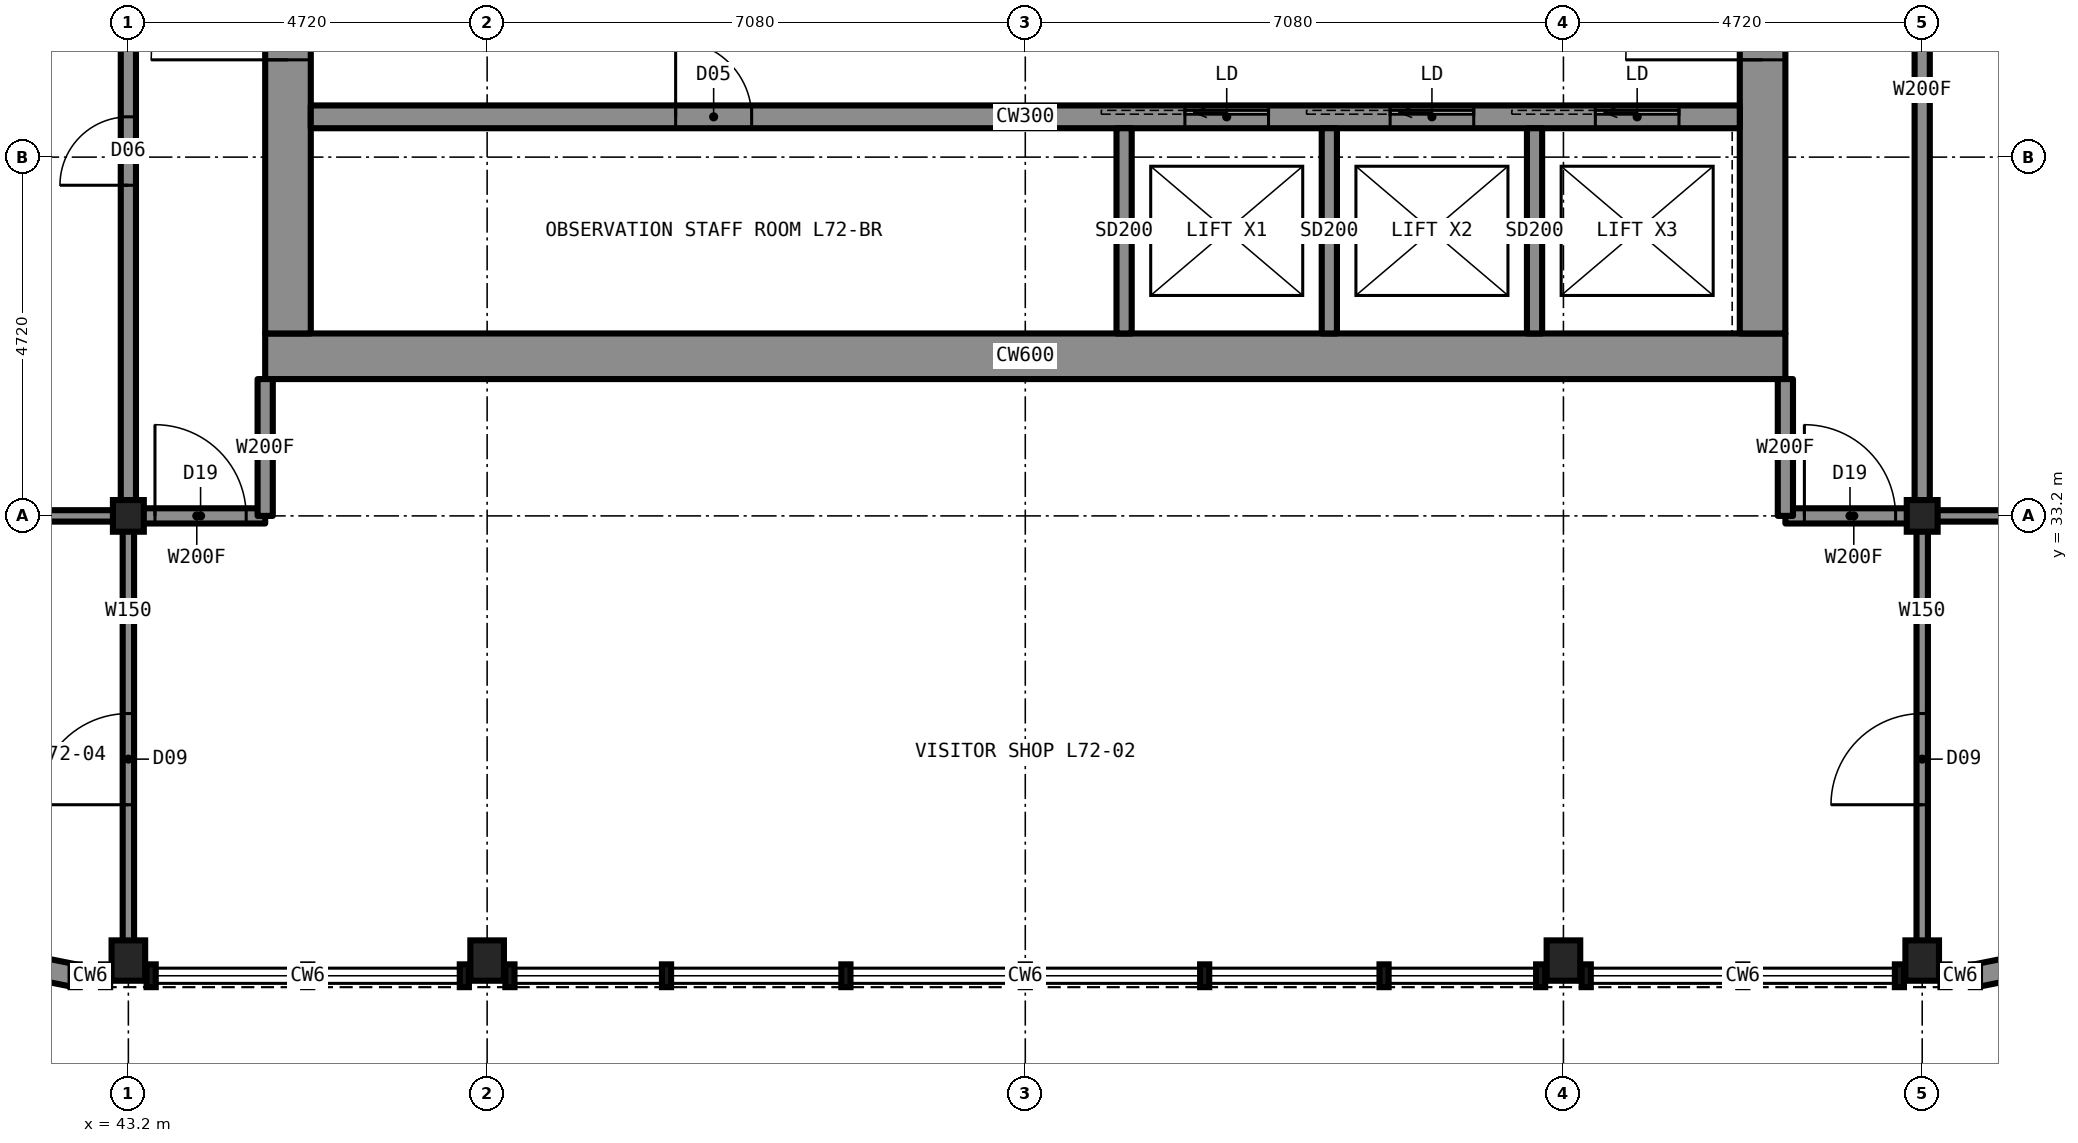
"""IFC4 building model, lengths in metres.
Left out: names, types, materials, properties, quantities, classifications, styles, units other than length and angle.
Written with IfcOpenShell. Run it as: python <this file> out.ifc"""

import sys

from ifc_helpers import new_model, si_unit, direction, frame, frame_2d, origin, origin_2d, place, context, subcontext, project, spatial, rectangle, i_section, extrude, element, fill, save


model = new_model("IFC4")
c1 = context("Model", 3, precision=1e-05, world=origin(), true_north=direction((0.0, 1.0)))
c2 = subcontext(c1, "Body", "Model", "MODEL_VIEW")
j1 = project(units=[si_unit("LENGTHUNIT", "METRE"), si_unit("PLANEANGLEUNIT", "RADIAN")], contexts=[c1])
p1 = place(None, origin())
s1 = spatial("IfcSite", under=j1, at=p1, CompositionType="ELEMENT")
p2 = place(p1, origin())
s2 = spatial("IfcBuilding", under=s1, at=p2, CompositionType="ELEMENT")
p3 = place(p2, frame((0.0, 0.0, 266.7)))
s3 = spatial("IfcBuildingStorey", under=s2, at=p3, CompositionType="ELEMENT", Elevation=266.7)
for number, where, z_axis, x_axis in (
    (1, (43.2, 27.35, 0.0), (0.0, 0.0, 1.0), (1.0, 0.0, 0.0)),
    (2, (47.92, 27.35, 0.0), (0.0, 0.0, 1.0), (1.0, 0.0, 0.0)),
    (3, (62.08, 27.35, 0.0), (0.0, 0.0, 1.0), (1.0, 0.0, 0.0)),
    (4, (66.8, 27.35, 0.0), (0.0, 0.0, 1.0), (1.0, 0.0, 0.0)),
):
    element("IfcColumn", number, at=place(p3, frame(where, z_axis=z_axis, x_axis=x_axis)), inside=s3, PredefinedType="COLUMN", context=c2, shape_type="SweptSolid", body=[
        extrude(i_section(OverallWidth=0.442, OverallDepth=0.531, WebThickness=0.066, FlangeThickness=0.106, at=origin_2d()), origin(), (0.0, 0.0, 1.0), 5.5),
    ])
for number, where, z_axis, x_axis in (
    (5, (43.2, 33.2, 0.0), (0.0, 0.0, 1.0), (1.0, 0.0, 0.0)),
    (6, (66.8, 33.2, 0.0), (0.0, 0.0, 1.0), (1.0, 0.0, 0.0)),
):
    element("IfcColumn", number, at=place(p3, frame(where, z_axis=z_axis, x_axis=x_axis)), inside=s3, PredefinedType="COLUMN", context=c2, shape_type="SweptSolid", body=[
        extrude(i_section(OverallWidth=0.406, OverallDepth=0.417, WebThickness=0.03, FlangeThickness=0.048, at=origin_2d()), origin(), (0.0, 0.0, 1.0), 5.5),
    ])
p4 = place(p3, frame((45.0, 35.3, 0.0), z_axis=(0.0, 0.0, 1.0), x_axis=(1.0, 0.0, 0.0)))
e7 = element("IfcWall", 7, at=p4, inside=s3, PredefinedType="SHEAR", context=c2, shape_type="SweptSolid", body=[
    extrude(rectangle(XDim=20.0, YDim=0.6, at=frame_2d((10.0, 0.0))), origin(), (0.0, 0.0, 1.0), 5.5),
])
p5 = place(p3, frame((64.7, 35.6, 0.0), z_axis=(0.0, 0.0, 1.0), x_axis=(0.0, 1.0, 0.0)))
e8 = element("IfcWall", 8, at=p5, inside=s3, PredefinedType="SHEAR", context=c2, shape_type="SweptSolid", body=[
    extrude(rectangle(XDim=18.8, YDim=0.6, at=frame_2d((9.4, 0.0))), origin(), (0.0, 0.0, 1.0), 5.5),
])
p6 = place(p5, frame((13.4, 0.0, 0.0)))
e9 = element("IfcOpeningElement", 9, at=p6, cuts=e8, PredefinedType="OPENING", context=c2, shape_type="SweptSolid", body=[
    extrude(rectangle(XDim=1.8, YDim=2.2, at=frame_2d((0.9, 1.1))), frame((0.0, 0.31, 0.0), z_axis=(0.0, -1.0, 0.0), x_axis=(1.0, 0.0, 0.0)), (0.0, 0.0, 1.0), 0.62),
])
p7 = place(p5, frame((3.6, 0.0, 0.0)))
e10 = element("IfcOpeningElement", 10, at=p7, cuts=e8, PredefinedType="OPENING", context=c2, shape_type="SweptSolid", body=[
    extrude(rectangle(XDim=1.8, YDim=2.2, at=frame_2d((0.9, 1.1))), frame((0.0, 0.31, 0.0), z_axis=(0.0, -1.0, 0.0), x_axis=(1.0, 0.0, 0.0)), (0.0, 0.0, 1.0), 0.62),
])
p8 = place(p3, frame((45.3, 35.6, 0.0), z_axis=(0.0, 0.0, 1.0), x_axis=(0.0, 1.0, 0.0)))
e11 = element("IfcWall", 11, at=p8, inside=s3, PredefinedType="SHEAR", context=c2, shape_type="SweptSolid", body=[
    extrude(rectangle(XDim=18.8, YDim=0.6, at=frame_2d((9.4, 0.0))), origin(), (0.0, 0.0, 1.0), 5.5),
])
p9 = place(p8, frame((13.4, 0.0, 0.0)))
e12 = element("IfcOpeningElement", 12, at=p9, cuts=e11, PredefinedType="OPENING", context=c2, shape_type="SweptSolid", body=[
    extrude(rectangle(XDim=1.8, YDim=2.2, at=frame_2d((0.9, 1.1))), frame((0.0, 0.31, 0.0), z_axis=(0.0, -1.0, 0.0), x_axis=(1.0, 0.0, 0.0)), (0.0, 0.0, 1.0), 0.62),
])
p10 = place(p8, frame((3.6, 0.0, 0.0)))
e13 = element("IfcOpeningElement", 13, at=p10, cuts=e11, PredefinedType="OPENING", context=c2, shape_type="SweptSolid", body=[
    extrude(rectangle(XDim=1.8, YDim=2.2, at=frame_2d((0.9, 1.1))), frame((0.0, 0.31, 0.0), z_axis=(0.0, -1.0, 0.0), x_axis=(1.0, 0.0, 0.0)), (0.0, 0.0, 1.0), 0.62),
])
p11 = place(p8, frame((6.4, 0.0, 0.0)))
e14 = element("IfcOpeningElement", 14, at=p11, cuts=e11, PredefinedType="OPENING", context=c2, shape_type="SweptSolid", body=[
    extrude(rectangle(XDim=1.2, YDim=2.2, at=frame_2d((0.6, 1.1))), frame((0.0, 0.31, 0.0), z_axis=(0.0, -1.0, 0.0), x_axis=(1.0, 0.0, 0.0)), (0.0, 0.0, 1.0), 0.62),
])
p12 = place(p3, frame((45.6, 38.45, 0.0), z_axis=(0.0, 0.0, 1.0), x_axis=(1.0, 0.0, 0.0)))
e15 = element("IfcWall", 15, at=p12, inside=s3, PredefinedType="SHEAR", context=c2, shape_type="SweptSolid", body=[
    extrude(rectangle(XDim=18.8, YDim=0.3, at=frame_2d((9.4, 0.0))), origin(), (0.0, 0.0, 1.0), 5.5),
])
p13 = place(p12, frame((4.8, 0.0, 0.0)))
e16 = element("IfcOpeningElement", 16, at=p13, cuts=e15, PredefinedType="OPENING", context=c2, shape_type="SweptSolid", body=[
    extrude(rectangle(XDim=1.0, YDim=2.1, at=frame_2d((0.5, 1.05))), frame((0.0, 0.16, 0.0), z_axis=(0.0, -1.0, 0.0), x_axis=(1.0, 0.0, 0.0)), (0.0, 0.0, 1.0), 0.32),
])
p14 = place(p12, frame((11.5, 0.0, 0.0)))
e17 = element("IfcOpeningElement", 17, at=p14, cuts=e15, PredefinedType="OPENING", context=c2, shape_type="SweptSolid", body=[
    extrude(rectangle(XDim=1.1, YDim=2.2, at=frame_2d((0.55, 1.1))), frame((0.0, 0.16, 0.0), z_axis=(0.0, -1.0, 0.0), x_axis=(1.0, 0.0, 0.0)), (0.0, 0.0, 1.0), 0.32),
])
p15 = place(p12, frame((14.2, 0.0, 0.0)))
e18 = element("IfcOpeningElement", 18, at=p15, cuts=e15, PredefinedType="OPENING", context=c2, shape_type="SweptSolid", body=[
    extrude(rectangle(XDim=1.1, YDim=2.2, at=frame_2d((0.55, 1.1))), frame((0.0, 0.16, 0.0), z_axis=(0.0, -1.0, 0.0), x_axis=(1.0, 0.0, 0.0)), (0.0, 0.0, 1.0), 0.32),
])
p16 = place(p12, frame((16.9, 0.0, 0.0)))
e19 = element("IfcOpeningElement", 19, at=p16, cuts=e15, PredefinedType="OPENING", context=c2, shape_type="SweptSolid", body=[
    extrude(rectangle(XDim=1.1, YDim=2.2, at=frame_2d((0.55, 1.1))), frame((0.0, 0.16, 0.0), z_axis=(0.0, -1.0, 0.0), x_axis=(1.0, 0.0, 0.0)), (0.0, 0.0, 1.0), 0.32),
])
p17 = place(p3, frame((43.2, 33.2, 0.0), z_axis=(0.0, 0.0, 1.0), x_axis=(1.0, 0.0, 0.0)))
e20 = element("IfcWall", 20, at=p17, inside=s3, PredefinedType="PARTITIONING", context=c2, shape_type="SweptSolid", body=[
    extrude(rectangle(XDim=1.8, YDim=0.2, at=frame_2d((0.9, 0.0))), origin(), (0.0, 0.0, 1.0), 5.28),
])
p18 = place(p17, frame((0.35, 0.0, 0.0)))
e21 = element("IfcOpeningElement", 21, at=p18, cuts=e20, PredefinedType="OPENING", context=c2, shape_type="SweptSolid", body=[
    extrude(rectangle(XDim=1.2, YDim=2.2, at=frame_2d((0.6, 1.1))), frame((0.0, 0.11, 0.0), z_axis=(0.0, -1.0, 0.0), x_axis=(1.0, 0.0, 0.0)), (0.0, 0.0, 1.0), 0.22),
])
p19 = place(p3, frame((65.0, 33.2, 0.0), z_axis=(0.0, 0.0, 1.0), x_axis=(1.0, 0.0, 0.0)))
e22 = element("IfcWall", 22, at=p19, inside=s3, PredefinedType="PARTITIONING", context=c2, shape_type="SweptSolid", body=[
    extrude(rectangle(XDim=1.8, YDim=0.2, at=frame_2d((0.9, 0.0))), origin(), (0.0, 0.0, 1.0), 5.28),
])
p20 = place(p19, frame((0.25, 0.0, 0.0)))
e23 = element("IfcOpeningElement", 23, at=p20, cuts=e22, PredefinedType="OPENING", context=c2, shape_type="SweptSolid", body=[
    extrude(rectangle(XDim=1.2, YDim=2.2, at=frame_2d((0.6, 1.1))), frame((0.0, 0.11, 0.0), z_axis=(0.0, -1.0, 0.0), x_axis=(1.0, 0.0, 0.0)), (0.0, 0.0, 1.0), 0.22),
])
for number, where, z_axis, x_axis in (
    (24, (37.3, 33.2, 0.0), (0.0, 0.0, 1.0), (1.0, 0.0, 0.0)),
    (25, (66.8, 33.2, 0.0), (0.0, 0.0, 1.0), (1.0, 0.0, 0.0)),
):
    element("IfcWall", number, at=place(p3, frame(where, z_axis=z_axis, x_axis=x_axis)), inside=s3, PredefinedType="PARTITIONING", context=c2, shape_type="SweptSolid", body=[
        extrude(rectangle(XDim=5.9, YDim=0.15, at=frame_2d((2.95, 0.0))), origin(), (0.0, 0.0, 1.0), 4.368),
    ])
p21 = place(p3, frame((45.0, 33.2, 0.0), z_axis=(0.0, 0.0, 1.0), x_axis=(0.0, 1.0, 0.0)))
e26 = element("IfcWall", 26, at=p21, inside=s3, PredefinedType="PARTITIONING", context=c2, shape_type="SweptSolid", body=[
    extrude(rectangle(XDim=1.8, YDim=0.2, at=frame_2d((0.9, 0.0))), origin(), (0.0, 0.0, 1.0), 5.28),
])
p22 = place(p3, frame((43.2, 33.2, 0.0), z_axis=(0.0, 0.0, 1.0), x_axis=(0.0, 1.0, 0.0)))
e27 = element("IfcWall", 27, at=p22, inside=s3, PredefinedType="PARTITIONING", context=c2, shape_type="SweptSolid", body=[
    extrude(rectangle(XDim=23.6, YDim=0.2, at=frame_2d((11.8, 0.0))), origin(), (0.0, 0.0, 1.0), 5.28),
])
p23 = place(p22, frame((20.74, 0.0, 0.0)))
e28 = element("IfcOpeningElement", 28, at=p23, cuts=e27, PredefinedType="OPENING", context=c2, shape_type="SweptSolid", body=[
    extrude(rectangle(XDim=1.0, YDim=2.1, at=frame_2d((0.5, 1.05))), frame((0.0, 0.11, 0.0), z_axis=(0.0, -1.0, 0.0), x_axis=(1.0, 0.0, 0.0)), (0.0, 0.0, 1.0), 0.22),
])
p24 = place(p22, frame((4.35, 0.0, 0.0)))
e29 = element("IfcOpeningElement", 29, at=p24, cuts=e27, PredefinedType="OPENING", context=c2, shape_type="SweptSolid", body=[
    extrude(rectangle(XDim=0.9, YDim=2.1, at=frame_2d((0.45, 1.05))), frame((0.0, 0.11, 0.0), z_axis=(0.0, -1.0, 0.0), x_axis=(1.0, 0.0, 0.0)), (0.0, 0.0, 1.0), 0.22),
])
p25 = place(p22, frame((13.75, 0.0, 0.0)))
e30 = element("IfcOpeningElement", 30, at=p25, cuts=e27, PredefinedType="OPENING", context=c2, shape_type="SweptSolid", body=[
    extrude(rectangle(XDim=0.9, YDim=2.1, at=frame_2d((0.45, 1.05))), frame((0.0, 0.11, 0.0), z_axis=(0.0, -1.0, 0.0), x_axis=(1.0, 0.0, 0.0)), (0.0, 0.0, 1.0), 0.22),
])
p26 = place(p3, frame((43.2, 27.3, 0.0), z_axis=(0.0, 0.0, 1.0), x_axis=(0.0, 1.0, 0.0)))
e31 = element("IfcWall", 31, at=p26, inside=s3, PredefinedType="PARTITIONING", context=c2, shape_type="SweptSolid", body=[
    extrude(rectangle(XDim=5.9, YDim=0.15, at=frame_2d((2.95, 0.0))), origin(), (0.0, 0.0, 1.0), 4.368),
])
p27 = place(p26, frame((2.1, 0.0, 0.0)))
e32 = element("IfcOpeningElement", 32, at=p27, cuts=e31, PredefinedType="OPENING", context=c2, shape_type="SweptSolid", body=[
    extrude(rectangle(XDim=1.2, YDim=2.2, at=frame_2d((0.6, 1.1))), frame((0.0, 0.085, 0.0), z_axis=(0.0, -1.0, 0.0), x_axis=(1.0, 0.0, 0.0)), (0.0, 0.0, 1.0), 0.17),
])
p28 = place(p3, frame((65.0, 33.2, 0.0), z_axis=(0.0, 0.0, 1.0), x_axis=(0.0, 1.0, 0.0)))
e33 = element("IfcWall", 33, at=p28, inside=s3, PredefinedType="PARTITIONING", context=c2, shape_type="SweptSolid", body=[
    extrude(rectangle(XDim=1.8, YDim=0.2, at=frame_2d((0.9, 0.0))), origin(), (0.0, 0.0, 1.0), 5.28),
])
p29 = place(p3, frame((66.8, 33.2, 0.0), z_axis=(0.0, 0.0, 1.0), x_axis=(0.0, 1.0, 0.0)))
e34 = element("IfcWall", 34, at=p29, inside=s3, PredefinedType="PARTITIONING", context=c2, shape_type="SweptSolid", body=[
    extrude(rectangle(XDim=23.6, YDim=0.2, at=frame_2d((11.8, 0.0))), origin(), (0.0, 0.0, 1.0), 5.28),
])
p30 = place(p29, frame((11.3, 0.0, 0.0)))
e35 = element("IfcOpeningElement", 35, at=p30, cuts=e34, PredefinedType="OPENING", context=c2, shape_type="SweptSolid", body=[
    extrude(rectangle(XDim=1.0, YDim=2.1, at=frame_2d((0.5, 1.05))), frame((0.0, 0.11, 0.0), z_axis=(0.0, -1.0, 0.0), x_axis=(1.0, 0.0, 0.0)), (0.0, 0.0, 1.0), 0.22),
])
p31 = place(p3, frame((66.8, 27.3, 0.0), z_axis=(0.0, 0.0, 1.0), x_axis=(0.0, 1.0, 0.0)))
e36 = element("IfcWall", 36, at=p31, inside=s3, PredefinedType="PARTITIONING", context=c2, shape_type="SweptSolid", body=[
    extrude(rectangle(XDim=5.9, YDim=0.15, at=frame_2d((2.95, 0.0))), origin(), (0.0, 0.0, 1.0), 4.368),
])
p32 = place(p31, frame((2.1, 0.0, 0.0)))
e37 = element("IfcOpeningElement", 37, at=p32, cuts=e36, PredefinedType="OPENING", context=c2, shape_type="SweptSolid", body=[
    extrude(rectangle(XDim=1.2, YDim=2.2, at=frame_2d((0.6, 1.1))), frame((0.0, 0.085, 0.0), z_axis=(0.0, -1.0, 0.0), x_axis=(1.0, 0.0, 0.0)), (0.0, 0.0, 1.0), 0.17),
])
for number, where, z_axis, x_axis in (
    (38, (56.3, 35.6, 0.0), (0.0, 0.0, 1.0), (0.0, 1.0, 0.0)),
    (39, (59.0, 35.6, 0.0), (0.0, 0.0, 1.0), (0.0, 1.0, 0.0)),
    (40, (61.7, 35.6, 0.0), (0.0, 0.0, 1.0), (0.0, 1.0, 0.0)),
):
    element("IfcWall", number, at=place(p3, frame(where, z_axis=z_axis, x_axis=x_axis)), inside=s3, PredefinedType="PARTITIONING", context=c2, shape_type="SweptSolid", body=[
        extrude(rectangle(XDim=2.7, YDim=0.2, at=frame_2d((1.35, 0.0))), origin(), (0.0, 0.0, 1.0), 5.28),
    ])
for number, where, z_axis, x_axis in (
    (41, (67.5, 27.15, 0.0), (0.0, 0.0, 1.0), (0.981, 0.195, 0.0)),
    (42, (40.453, 27.557, 0.0), (0.0, 0.0, 1.0), (0.981, -0.195, 0.0)),
):
    element("IfcWall", number, at=place(p3, frame(where, z_axis=z_axis, x_axis=x_axis)), inside=s3, PredefinedType="SOLIDWALL", context=c2, shape_type="SweptSolid", body=[
        extrude(rectangle(XDim=2.087, YDim=0.3, at=frame_2d((1.044, 0.0))), origin(), (0.0, 0.0, 1.0), 5.28),
    ])
p33 = place(p18, origin())
e43 = element("IfcDoor", 43, at=p33, inside=s3, OperationType="SINGLE_SWING_LEFT", PredefinedType="DOOR", context=c2, shape_type="SweptSolid", body=[
    extrude(rectangle(XDim=1.2, YDim=2.2, at=frame_2d((0.6, 1.1))), frame((0.0, 0.025, 0.0), z_axis=(0.0, -1.0, 0.0), x_axis=(1.0, 0.0, 0.0)), (0.0, 0.0, 1.0), 0.05),
])
fill(e21, e43)
p34 = place(p20, origin())
e44 = element("IfcDoor", 44, at=p34, inside=s3, OperationType="SINGLE_SWING_LEFT", PredefinedType="DOOR", context=c2, shape_type="SweptSolid", body=[
    extrude(rectangle(XDim=1.2, YDim=2.2, at=frame_2d((0.6, 1.1))), frame((0.0, 0.025, 0.0), z_axis=(0.0, -1.0, 0.0), x_axis=(1.0, 0.0, 0.0)), (0.0, 0.0, 1.0), 0.05),
])
fill(e23, e44)
p35 = place(p32, origin())
e45 = element("IfcDoor", 45, at=p35, inside=s3, OperationType="SINGLE_SWING_LEFT", PredefinedType="DOOR", context=c2, shape_type="SweptSolid", body=[
    extrude(rectangle(XDim=1.2, YDim=2.2, at=frame_2d((0.6, 1.1))), frame((0.0, 0.025, 0.0), z_axis=(0.0, -1.0, 0.0), x_axis=(1.0, 0.0, 0.0)), (0.0, 0.0, 1.0), 0.05),
])
fill(e37, e45)
p36 = place(p27, origin())
e46 = element("IfcDoor", 46, at=p36, inside=s3, OperationType="SINGLE_SWING_LEFT", PredefinedType="DOOR", context=c2, shape_type="SweptSolid", body=[
    extrude(rectangle(XDim=1.2, YDim=2.2, at=frame_2d((0.6, 1.1))), frame((0.0, 0.025, 0.0), z_axis=(0.0, -1.0, 0.0), x_axis=(1.0, 0.0, 0.0)), (0.0, 0.0, 1.0), 0.05),
])
fill(e32, e46)
p37 = place(p24, origin())
e47 = element("IfcDoor", 47, at=p37, inside=s3, OperationType="SINGLE_SWING_LEFT", PredefinedType="DOOR", context=c2, shape_type="SweptSolid", body=[
    extrude(rectangle(XDim=0.9, YDim=2.1, at=frame_2d((0.45, 1.05))), frame((0.0, 0.025, 0.0), z_axis=(0.0, -1.0, 0.0), x_axis=(1.0, 0.0, 0.0)), (0.0, 0.0, 1.0), 0.05),
])
fill(e29, e47)
p38 = place(p10, origin())
e48 = element("IfcDoor", 48, at=p38, inside=s3, OperationType="DOUBLE_DOOR_SINGLE_SWING", PredefinedType="DOOR", context=c2, shape_type="SweptSolid", body=[
    extrude(rectangle(XDim=1.8, YDim=2.2, at=frame_2d((0.9, 1.1))), frame((0.0, 0.025, 0.0), z_axis=(0.0, -1.0, 0.0), x_axis=(1.0, 0.0, 0.0)), (0.0, 0.0, 1.0), 0.05),
])
fill(e13, e48)
p39 = place(p7, origin())
e49 = element("IfcDoor", 49, at=p39, inside=s3, OperationType="DOUBLE_DOOR_SINGLE_SWING", PredefinedType="DOOR", context=c2, shape_type="SweptSolid", body=[
    extrude(rectangle(XDim=1.8, YDim=2.2, at=frame_2d((0.9, 1.1))), frame((0.0, 0.025, 0.0), z_axis=(0.0, -1.0, 0.0), x_axis=(1.0, 0.0, 0.0)), (0.0, 0.0, 1.0), 0.05),
])
fill(e10, e49)
p40 = place(p13, origin())
e50 = element("IfcDoor", 50, at=p40, inside=s3, OperationType="SINGLE_SWING_LEFT", PredefinedType="DOOR", context=c2, shape_type="SweptSolid", body=[
    extrude(rectangle(XDim=1.0, YDim=2.1, at=frame_2d((0.5, 1.05))), frame((0.0, 0.025, 0.0), z_axis=(0.0, -1.0, 0.0), x_axis=(1.0, 0.0, 0.0)), (0.0, 0.0, 1.0), 0.05),
])
fill(e16, e50)
p41 = place(p14, origin())
e51 = element("IfcDoor", 51, at=p41, inside=s3, OperationType="SLIDING_TO_LEFT", PredefinedType="DOOR", context=c2, shape_type="SweptSolid", body=[
    extrude(rectangle(XDim=1.1, YDim=2.2, at=frame_2d((0.55, 1.1))), frame((0.0, 0.025, 0.0), z_axis=(0.0, -1.0, 0.0), x_axis=(1.0, 0.0, 0.0)), (0.0, 0.0, 1.0), 0.05),
])
fill(e17, e51)
p42 = place(p15, origin())
e52 = element("IfcDoor", 52, at=p42, inside=s3, OperationType="SLIDING_TO_LEFT", PredefinedType="DOOR", context=c2, shape_type="SweptSolid", body=[
    extrude(rectangle(XDim=1.1, YDim=2.2, at=frame_2d((0.55, 1.1))), frame((0.0, 0.025, 0.0), z_axis=(0.0, -1.0, 0.0), x_axis=(1.0, 0.0, 0.0)), (0.0, 0.0, 1.0), 0.05),
])
fill(e18, e52)
p43 = place(p16, origin())
e53 = element("IfcDoor", 53, at=p43, inside=s3, OperationType="SLIDING_TO_LEFT", PredefinedType="DOOR", context=c2, shape_type="SweptSolid", body=[
    extrude(rectangle(XDim=1.1, YDim=2.2, at=frame_2d((0.55, 1.1))), frame((0.0, 0.025, 0.0), z_axis=(0.0, -1.0, 0.0), x_axis=(1.0, 0.0, 0.0)), (0.0, 0.0, 1.0), 0.05),
])
fill(e19, e53)
save(model, sys.argv[1])
